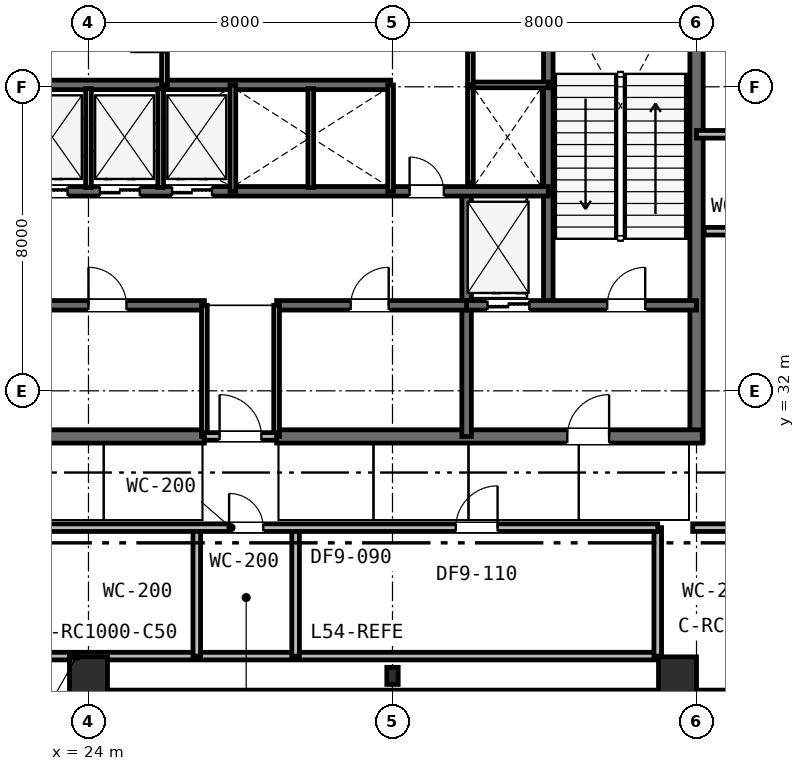
"""IFC4 building model, lengths in metres.
Left out: names, types, materials, properties, quantities, classifications, styles, units other than length and angle.
Written with IfcOpenShell. Run it as: python <this file> out.ifc"""

import sys

from ifc_helpers import new_model, si_unit, direction, frame, frame_2d, origin, origin_2d, place, context, subcontext, project, spatial, rectangle, i_section, extrude, element, fill, save


model = new_model("IFC4")
c1 = context("Model", 3, precision=1e-05, world=origin(), true_north=direction((0.0, 1.0)))
c2 = subcontext(c1, "Body", "Model", "MODEL_VIEW")
j1 = project(units=[si_unit("LENGTHUNIT", "METRE"), si_unit("PLANEANGLEUNIT", "RADIAN")], contexts=[c1])
p1 = place(None, origin())
s1 = spatial("IfcSite", under=j1, at=p1, CompositionType="ELEMENT")
p2 = place(p1, origin())
s2 = spatial("IfcBuilding", under=s1, at=p2, CompositionType="ELEMENT")
p3 = place(p2, frame((0.0, 0.0, 208.2)))
s3 = spatial("IfcBuildingStorey", under=s2, at=p3, CompositionType="ELEMENT", Elevation=208.2)
p4 = place(p3, frame((40.0, 30.65, 0.0), z_axis=(0.0, 0.0, 1.0), x_axis=(0.0, 1.0, 0.0)))
e1 = element("IfcWall", 1, at=p4, inside=s3, PredefinedType="SHEAR", context=c2, shape_type="SweptSolid", body=[
    extrude(rectangle(XDim=12.3, YDim=0.35, at=frame_2d((6.15, 0.0))), origin(), (0.0, 0.0, 1.0), 4.8),
])
p5 = place(p3, frame((15.85, 30.8, 0.0), z_axis=(0.0, 0.0, 1.0), x_axis=(1.0, 0.0, 0.0)))
e2 = element("IfcWall", 2, at=p5, inside=s3, PredefinedType="SHEAR", context=c2, shape_type="SweptSolid", body=[
    extrude(rectangle(XDim=11.2, YDim=0.35, at=frame_2d((5.6, 0.0))), origin(), (0.0, 0.0, 1.0), 4.8),
])
p6 = place(p5, frame((2.45, 0.0, 0.0)))
e3 = element("IfcOpeningElement", 3, at=p6, cuts=e2, PredefinedType="OPENING", context=c2, shape_type="SweptSolid", body=[
    extrude(rectangle(XDim=1.1, YDim=2.15, at=frame_2d((0.55, 1.075))), frame((0.0, 0.185, 0.0), z_axis=(0.0, -1.0, 0.0), x_axis=(1.0, 0.0, 0.0)), (0.0, 0.0, 1.0), 0.37),
])
p7 = place(p3, frame((28.95, 30.8, 0.0), z_axis=(0.0, 0.0, 1.0), x_axis=(1.0, 0.0, 0.0)))
e4 = element("IfcWall", 4, at=p7, inside=s3, PredefinedType="SHEAR", context=c2, shape_type="SweptSolid", body=[
    extrude(rectangle(XDim=11.2, YDim=0.35, at=frame_2d((5.6, 0.0))), origin(), (0.0, 0.0, 1.0), 4.8),
])
p8 = place(p7, frame((7.65, 0.0, 0.0)))
e5 = element("IfcOpeningElement", 5, at=p8, cuts=e4, PredefinedType="OPENING", context=c2, shape_type="SweptSolid", body=[
    extrude(rectangle(XDim=1.1, YDim=2.15, at=frame_2d((0.55, 1.075))), frame((0.0, 0.185, 0.0), z_axis=(0.0, -1.0, 0.0), x_axis=(1.0, 0.0, 0.0)), (0.0, 0.0, 1.0), 0.37),
])
p9 = place(p3, frame((36.1, 34.25, 0.0), z_axis=(0.0, 0.0, 1.0), x_axis=(0.0, 1.0, 0.0)))
e6 = element("IfcWall", 6, at=p9, inside=s3, PredefinedType="SHEAR", context=c2, shape_type="SweptSolid", body=[
    extrude(rectangle(XDim=8.65, YDim=0.25, at=frame_2d((4.325, 0.0))), origin(), (0.0, 0.0, 1.0), 4.8),
])
p10 = place(p3, frame((33.95, 30.8, 0.0), z_axis=(0.0, 0.0, 1.0), x_axis=(0.0, 1.0, 0.0)))
e7 = element("IfcWall", 7, at=p10, inside=s3, PredefinedType="SHEAR", context=c2, shape_type="SweptSolid", body=[
    extrude(rectangle(XDim=6.45, YDim=0.25, at=frame_2d((3.225, 0.0))), origin(), (0.0, 0.0, 1.0), 4.8),
])
p11 = place(p3, frame((33.95, 34.25, 0.0), z_axis=(0.0, 0.0, 1.0), x_axis=(1.0, 0.0, 0.0)))
e8 = element("IfcWall", 8, at=p11, inside=s3, PredefinedType="SHEAR", context=c2, shape_type="SweptSolid", body=[
    extrude(rectangle(XDim=6.05, YDim=0.25, at=frame_2d((3.025, 0.0))), origin(), (0.0, 0.0, 1.0), 4.8),
])
p12 = place(p11, frame((3.7, 0.0, 0.0)))
e9 = element("IfcOpeningElement", 9, at=p12, cuts=e8, PredefinedType="OPENING", context=c2, shape_type="SweptSolid", body=[
    extrude(rectangle(XDim=1.0, YDim=2.15, at=frame_2d((0.5, 1.075))), frame((0.0, 0.135, 0.0), z_axis=(0.0, -1.0, 0.0), x_axis=(1.0, 0.0, 0.0)), (0.0, 0.0, 1.0), 0.27),
])
p13 = place(p11, frame((0.55, 0.0, 0.0)))
e10 = element("IfcOpeningElement", 10, at=p13, cuts=e8, PredefinedType="OPENING", context=c2, shape_type="SweptSolid", body=[
    extrude(rectangle(XDim=1.1, YDim=2.15, at=frame_2d((0.55, 1.075))), frame((0.0, 0.135, 0.0), z_axis=(0.0, -1.0, 0.0), x_axis=(1.0, 0.0, 0.0)), (0.0, 0.0, 1.0), 0.27),
])
p14 = place(p3, frame((22.05, 34.25, 0.0), z_axis=(0.0, 0.0, 1.0), x_axis=(1.0, 0.0, 0.0)))
e11 = element("IfcWall", 11, at=p14, inside=s3, PredefinedType="SHEAR", context=c2, shape_type="SweptSolid", body=[
    extrude(rectangle(XDim=5.0, YDim=0.25, at=frame_2d((2.5, 0.0))), origin(), (0.0, 0.0, 1.0), 4.8),
])
p15 = place(p14, frame((1.95, 0.0, 0.0)))
e12 = element("IfcOpeningElement", 12, at=p15, cuts=e11, PredefinedType="OPENING", context=c2, shape_type="SweptSolid", body=[
    extrude(rectangle(XDim=1.0, YDim=2.15, at=frame_2d((0.5, 1.075))), frame((0.0, 0.135, 0.0), z_axis=(0.0, -1.0, 0.0), x_axis=(1.0, 0.0, 0.0)), (0.0, 0.0, 1.0), 0.27),
])
p16 = place(p3, frame((28.95, 34.25, 0.0), z_axis=(0.0, 0.0, 1.0), x_axis=(1.0, 0.0, 0.0)))
e13 = element("IfcWall", 13, at=p16, inside=s3, PredefinedType="SHEAR", context=c2, shape_type="SweptSolid", body=[
    extrude(rectangle(XDim=5.0, YDim=0.25, at=frame_2d((2.5, 0.0))), origin(), (0.0, 0.0, 1.0), 4.8),
])
p17 = place(p16, frame((1.95, 0.0, 0.0)))
e14 = element("IfcOpeningElement", 14, at=p17, cuts=e13, PredefinedType="OPENING", context=c2, shape_type="SweptSolid", body=[
    extrude(rectangle(XDim=1.0, YDim=2.15, at=frame_2d((0.5, 1.075))), frame((0.0, 0.135, 0.0), z_axis=(0.0, -1.0, 0.0), x_axis=(1.0, 0.0, 0.0)), (0.0, 0.0, 1.0), 0.27),
])
p18 = place(p3, frame((19.9, 37.25, 0.0), z_axis=(0.0, 0.0, 1.0), x_axis=(1.0, 0.0, 0.0)))
e15 = element("IfcWall", 15, at=p18, inside=s3, PredefinedType="SHEAR", context=c2, shape_type="SweptSolid", body=[
    extrude(rectangle(XDim=16.2, YDim=0.25, at=frame_2d((8.1, 0.0))), origin(), (0.0, 0.0, 1.0), 4.8),
])
p19 = place(p18, frame((12.55, 0.0, 0.0)))
e16 = element("IfcOpeningElement", 16, at=p19, cuts=e15, PredefinedType="OPENING", context=c2, shape_type="SweptSolid", body=[
    extrude(rectangle(XDim=0.9, YDim=2.15, at=frame_2d((0.45, 1.075))), frame((0.0, 0.135, 0.0), z_axis=(0.0, -1.0, 0.0), x_axis=(1.0, 0.0, 0.0)), (0.0, 0.0, 1.0), 0.27),
])
p20 = place(p18, frame((2.5, 0.0, 0.0)))
e17 = element("IfcOpeningElement", 17, at=p20, cuts=e15, PredefinedType="OPENING", context=c2, shape_type="SweptSolid", body=[
    extrude(rectangle(XDim=1.05, YDim=2.15, at=frame_2d((0.525, 1.075))), frame((0.0, 0.135, 0.0), z_axis=(0.0, -1.0, 0.0), x_axis=(1.0, 0.0, 0.0)), (0.0, 0.0, 1.0), 0.27),
])
p21 = place(p18, frame((4.4, 0.0, 0.0)))
e18 = element("IfcOpeningElement", 18, at=p21, cuts=e15, PredefinedType="OPENING", context=c2, shape_type="SweptSolid", body=[
    extrude(rectangle(XDim=1.05, YDim=2.15, at=frame_2d((0.525, 1.075))), frame((0.0, 0.135, 0.0), z_axis=(0.0, -1.0, 0.0), x_axis=(1.0, 0.0, 0.0)), (0.0, 0.0, 1.0), 0.27),
])
p22 = place(p18, frame((6.3, 0.0, 0.0)))
e19 = element("IfcOpeningElement", 19, at=p22, cuts=e15, PredefinedType="OPENING", context=c2, shape_type="SweptSolid", body=[
    extrude(rectangle(XDim=1.05, YDim=2.15, at=frame_2d((0.525, 1.075))), frame((0.0, 0.135, 0.0), z_axis=(0.0, -1.0, 0.0), x_axis=(1.0, 0.0, 0.0)), (0.0, 0.0, 1.0), 0.27),
])
p23 = place(p3, frame((19.9, 40.05, 0.0), z_axis=(0.0, 0.0, 1.0), x_axis=(1.0, 0.0, 0.0)))
e20 = element("IfcWall", 20, at=p23, inside=s3, PredefinedType="SHEAR", context=c2, shape_type="SweptSolid", body=[
    extrude(rectangle(XDim=12.05, YDim=0.25, at=frame_2d((6.025, 0.0))), origin(), (0.0, 0.0, 1.0), 4.8),
])
p24 = place(p3, frame((24.0, 24.5, 0.0), z_axis=(0.0, 0.0, 1.0), x_axis=(1.0, 0.0, 0.0)))
e21 = element("IfcColumn", 21, at=p24, inside=s3, PredefinedType="COLUMN", context=c2, shape_type="SweptSolid", body=[
    extrude(rectangle(XDim=1.0, YDim=1.0, at=origin_2d()), origin(), (0.0, 0.0, 1.0), 4.8),
])
p25 = place(p3, frame((32.0, 24.5, 0.0), z_axis=(0.0, 0.0, 1.0), x_axis=(1.0, 0.0, 0.0)))
e22 = element("IfcColumn", 22, at=p25, inside=s3, PredefinedType="COLUMN", context=c2, shape_type="SweptSolid", body=[
    extrude(i_section(OverallWidth=0.3, OverallDepth=0.45, WebThickness=0.014, FlangeThickness=0.026, FilletRadius=0.027, at=origin_2d()), origin(), (0.0, 0.0, 1.0), 4.8),
])
p26 = place(p3, frame((39.5, 24.5, 0.0), z_axis=(0.0, 0.0, 1.0), x_axis=(1.0, 0.0, 0.0)))
e23 = element("IfcColumn", 23, at=p26, inside=s3, PredefinedType="COLUMN", context=c2, shape_type="SweptSolid", body=[
    extrude(rectangle(XDim=1.0, YDim=1.0, at=origin_2d()), origin(), (0.0, 0.0, 1.0), 4.8),
])
p27 = place(p3, frame((24.5, 24.0, 0.0), z_axis=(0.0, 0.0, 1.0), x_axis=(1.0, 0.0, 0.0)))
e24 = element("IfcWall", 24, at=p27, inside=s3, PredefinedType="STANDARD", context=c2, shape_type="SweptSolid", body=[
    extrude(rectangle(XDim=14.5, YDim=0.25, at=frame_2d((7.25, 0.0))), origin(), (0.0, 0.0, 1.0), 1.15),
])
p28 = place(p3, frame((40.0, 24.0, 0.0), z_axis=(0.0, 0.0, 1.0), x_axis=(1.0, 0.0, 0.0)))
e25 = element("IfcWall", 25, at=p28, inside=s3, PredefinedType="STANDARD", context=c2, shape_type="SweptSolid", body=[
    extrude(rectangle(XDim=7.5, YDim=0.25, at=frame_2d((3.75, 0.0))), origin(), (0.0, 0.0, 1.0), 1.15),
])
for number, where, z_axis, x_axis in (
    (26, (27.05, 30.8, 0.0), (0.0, 0.0, 1.0), (0.0, 1.0, 0.0)),
    (27, (28.95, 30.8, 0.0), (0.0, 0.0, 1.0), (0.0, 1.0, 0.0)),
):
    element("IfcWall", number, at=place(p3, frame(where, z_axis=z_axis, x_axis=x_axis)), inside=s3, PredefinedType="PLUMBINGWALL", context=c2, shape_type="SweptSolid", body=[
        extrude(rectangle(XDim=3.45, YDim=0.15, at=frame_2d((1.725, 0.0))), origin(), (0.0, 0.0, 1.0), 4.02),
    ])
p29 = place(p3, frame((27.05, 30.8, 0.0), z_axis=(0.0, 0.0, 1.0), x_axis=(1.0, 0.0, 0.0)))
e28 = element("IfcWall", 28, at=p29, inside=s3, PredefinedType="PARTITIONING", context=c2, shape_type="SweptSolid", body=[
    extrude(rectangle(XDim=1.9, YDim=0.2, at=frame_2d((0.95, 0.0))), origin(), (0.0, 0.0, 1.0), 4.02),
])
p30 = place(p29, frame((0.4, 0.0, 0.0)))
e29 = element("IfcOpeningElement", 29, at=p30, cuts=e28, PredefinedType="OPENING", context=c2, shape_type="SweptSolid", body=[
    extrude(rectangle(XDim=1.1, YDim=2.15, at=frame_2d((0.55, 1.075))), frame((0.0, 0.11, 0.0), z_axis=(0.0, -1.0, 0.0), x_axis=(1.0, 0.0, 0.0)), (0.0, 0.0, 1.0), 0.22),
])
p31 = place(p3, frame((27.8, 37.25, 0.0), z_axis=(0.0, 0.0, 1.0), x_axis=(0.0, 1.0, 0.0)))
e30 = element("IfcWall", 30, at=p31, inside=s3, PredefinedType="PLUMBINGWALL", context=c2, shape_type="SweptSolid", body=[
    extrude(rectangle(XDim=2.8, YDim=0.15, at=frame_2d((1.4, 0.0))), origin(), (0.0, 0.0, 1.0), 4.02),
])
for number, where, z_axis, x_axis in (
    (31, (24.0, 37.35, 0.0), (0.0, 0.0, 1.0), (0.0, 1.0, 0.0)),
    (32, (25.9, 37.35, 0.0), (0.0, 0.0, 1.0), (0.0, 1.0, 0.0)),
):
    element("IfcWall", number, at=place(p3, frame(where, z_axis=z_axis, x_axis=x_axis)), inside=s3, PredefinedType="PLUMBINGWALL", context=c2, shape_type="SweptSolid", body=[
        extrude(rectangle(XDim=2.6, YDim=0.15, at=frame_2d((1.3, 0.0))), origin(), (0.0, 0.0, 1.0), 4.02),
    ])
p32 = place(p3, frame((31.95, 37.25, 0.0), z_axis=(0.0, 0.0, 1.0), x_axis=(0.0, 1.0, 0.0)))
e33 = element("IfcWall", 33, at=p32, inside=s3, PredefinedType="PLUMBINGWALL", context=c2, shape_type="SweptSolid", body=[
    extrude(rectangle(XDim=2.8, YDim=0.15, at=frame_2d((1.4, 0.0))), origin(), (0.0, 0.0, 1.0), 4.02),
])
p33 = place(p3, frame((29.85, 37.35, 0.0), z_axis=(0.0, 0.0, 1.0), x_axis=(0.0, 1.0, 0.0)))
e34 = element("IfcWall", 34, at=p33, inside=s3, PredefinedType="PLUMBINGWALL", context=c2, shape_type="SweptSolid", body=[
    extrude(rectangle(XDim=2.6, YDim=0.15, at=frame_2d((1.3, 0.0))), origin(), (0.0, 0.0, 1.0), 4.02),
])
p34 = place(p3, frame((34.05, 37.473, 0.0), z_axis=(0.0, 0.0, 1.0), x_axis=(0.0, 1.0, 0.0)))
e35 = element("IfcWall", 35, at=p34, inside=s3, PredefinedType="PLUMBINGWALL", context=c2, shape_type="SweptSolid", body=[
    extrude(rectangle(XDim=2.577, YDim=0.15, at=frame_2d((1.288, 0.0))), origin(), (0.0, 0.0, 1.0), 4.02),
])
p35 = place(p3, frame((34.05, 40.05, 0.0), z_axis=(0.0, 0.0, 1.0), x_axis=(1.0, 0.0, 0.0)))
e36 = element("IfcWall", 36, at=p35, inside=s3, PredefinedType="PARTITIONING", context=c2, shape_type="SweptSolid", body=[
    extrude(rectangle(XDim=2.05, YDim=0.15, at=frame_2d((1.025, 0.0))), origin(), (0.0, 0.0, 1.0), 4.02),
])
p36 = place(p3, frame((34.05, 40.05, 0.0), z_axis=(0.0, 0.0, 1.0), x_axis=(0.0, 1.0, 0.0)))
e37 = element("IfcWall", 37, at=p36, inside=s3, PredefinedType="PARTITIONING", context=c2, shape_type="SweptSolid", body=[
    extrude(rectangle(XDim=2.85, YDim=0.15, at=frame_2d((1.425, 0.0))), origin(), (0.0, 0.0, 1.0), 4.02),
])
p37 = place(p36, frame((0.865, 0.0, 0.0)))
e38 = element("IfcOpeningElement", 38, at=p37, cuts=e37, PredefinedType="OPENING", context=c2, shape_type="SweptSolid", body=[
    extrude(rectangle(XDim=0.9, YDim=2.15, at=frame_2d((0.45, 1.075))), frame((0.0, 0.085, 0.0), z_axis=(0.0, -1.0, 0.0), x_axis=(1.0, 0.0, 0.0)), (0.0, 0.0, 1.0), 0.17),
])
p38 = place(p3, frame((26.0, 40.05, 0.0), z_axis=(0.0, 0.0, 1.0), x_axis=(0.0, 1.0, 0.0)))
e39 = element("IfcWall", 39, at=p38, inside=s3, PredefinedType="PARTITIONING", context=c2, shape_type="SweptSolid", body=[
    extrude(rectangle(XDim=2.85, YDim=0.15, at=frame_2d((1.425, 0.0))), origin(), (0.0, 0.0, 1.0), 4.02),
])
p39 = place(p38, frame((0.865, 0.0, 0.0)))
e40 = element("IfcOpeningElement", 40, at=p39, cuts=e39, PredefinedType="OPENING", context=c2, shape_type="SweptSolid", body=[
    extrude(rectangle(XDim=0.9, YDim=2.15, at=frame_2d((0.45, 1.075))), frame((0.0, 0.085, 0.0), z_axis=(0.0, -1.0, 0.0), x_axis=(1.0, 0.0, 0.0)), (0.0, 0.0, 1.0), 0.17),
])
p40 = place(p3, frame((8.4, 25.02, 0.0), z_axis=(0.0, 0.0, 1.0), x_axis=(1.0, 0.0, 0.0)))
e41 = element("IfcWall", 41, at=p40, inside=s3, PredefinedType="PARTITIONING", context=c2, shape_type="SweptSolid", body=[
    extrude(rectangle(XDim=30.6, YDim=0.2, at=frame_2d((15.3, 0.0))), origin(), (0.0, 0.0, 1.0), 3.83),
])
p41 = place(p3, frame((38.98, 25.02, 0.0), z_axis=(0.0, 0.0, 1.0), x_axis=(0.0, 1.0, 0.0)))
e42 = element("IfcWall", 42, at=p41, inside=s3, PredefinedType="PARTITIONING", context=c2, shape_type="SweptSolid", body=[
    extrude(rectangle(XDim=3.38, YDim=0.2, at=frame_2d((1.69, 0.0))), origin(), (0.0, 0.0, 1.0), 3.83),
])
p42 = place(p3, frame((40.0, 38.75, 0.0), z_axis=(0.0, 0.0, 1.0), x_axis=(1.0, 0.0, 0.0)))
e43 = element("IfcWall", 43, at=p42, inside=s3, PredefinedType="PARTITIONING", context=c2, shape_type="SweptSolid", body=[
    extrude(rectangle(XDim=10.9, YDim=0.2, at=frame_2d((5.45, 0.0))), origin(), (0.0, 0.0, 1.0), 3.83),
])
for number, where, z_axis, x_axis in (
    (44, (26.85, 25.02, 0.0), (0.0, 0.0, 1.0), (0.0, 1.0, 0.0)),
    (45, (29.45, 25.02, 0.0), (0.0, 0.0, 1.0), (0.0, 1.0, 0.0)),
):
    element("IfcWall", number, at=place(p3, frame(where, z_axis=z_axis, x_axis=x_axis)), inside=s3, PredefinedType="PARTITIONING", context=c2, shape_type="SweptSolid", body=[
        extrude(rectangle(XDim=3.38, YDim=0.2, at=frame_2d((1.69, 0.0))), origin(), (0.0, 0.0, 1.0), 4.02),
    ])
p43 = place(p3, frame((16.52, 28.4, 0.0), z_axis=(0.0, 0.0, 1.0), x_axis=(1.0, 0.0, 0.0)))
e46 = element("IfcWall", 46, at=p43, inside=s3, PredefinedType="PARTITIONING", context=c2, shape_type="SweptSolid", body=[
    extrude(rectangle(XDim=22.46, YDim=0.2, at=frame_2d((11.23, 0.0))), origin(), (0.0, 0.0, 1.0), 3.83),
])
p44 = place(p43, frame((4.615, 0.0, 0.0)))
e47 = element("IfcOpeningElement", 47, at=p44, cuts=e46, PredefinedType="OPENING", context=c2, shape_type="SweptSolid", body=[
    extrude(rectangle(XDim=1.1, YDim=2.15, at=frame_2d((0.55, 1.075))), frame((0.0, 0.11, 0.0), z_axis=(0.0, -1.0, 0.0), x_axis=(1.0, 0.0, 0.0)), (0.0, 0.0, 1.0), 0.22),
])
p45 = place(p43, frame((11.18, 0.0, 0.0)))
e48 = element("IfcOpeningElement", 48, at=p45, cuts=e46, PredefinedType="OPENING", context=c2, shape_type="SweptSolid", body=[
    extrude(rectangle(XDim=0.9, YDim=2.15, at=frame_2d((0.45, 1.075))), frame((0.0, 0.11, 0.0), z_axis=(0.0, -1.0, 0.0), x_axis=(1.0, 0.0, 0.0)), (0.0, 0.0, 1.0), 0.22),
])
p46 = place(p43, frame((17.145, 0.0, 0.0)))
e49 = element("IfcOpeningElement", 49, at=p46, cuts=e46, PredefinedType="OPENING", context=c2, shape_type="SweptSolid", body=[
    extrude(rectangle(XDim=1.1, YDim=2.15, at=frame_2d((0.55, 1.075))), frame((0.0, 0.11, 0.0), z_axis=(0.0, -1.0, 0.0), x_axis=(1.0, 0.0, 0.0)), (0.0, 0.0, 1.0), 0.22),
])
p47 = place(p3, frame((39.9, 28.4, 0.0), z_axis=(0.0, 0.0, 1.0), x_axis=(1.0, 0.0, 0.0)))
e50 = element("IfcWall", 50, at=p47, inside=s3, PredefinedType="PARTITIONING", context=c2, shape_type="SweptSolid", body=[
    extrude(rectangle(XDim=2.5, YDim=0.2, at=frame_2d((1.25, 0.0))), origin(), (0.0, 0.0, 1.0), 3.83),
])
p48 = place(p3, frame((40.2, 36.2, 0.0), z_axis=(0.0, 0.0, 1.0), x_axis=(1.0, 0.0, 0.0)))
e51 = element("IfcWall", 51, at=p48, inside=s3, PredefinedType="PARTITIONING", context=c2, shape_type="SweptSolid", body=[
    extrude(rectangle(XDim=2.2, YDim=0.2, at=frame_2d((1.1, 0.0))), origin(), (0.0, 0.0, 1.0), 4.02),
])
p49 = place(p30, origin())
e52 = element("IfcDoor", 52, at=p49, inside=s3, OperationType="SINGLE_SWING_LEFT", PredefinedType="DOOR", context=c2, shape_type="SweptSolid", body=[
    extrude(rectangle(XDim=1.1, YDim=2.15, at=frame_2d((0.55, 1.075))), frame((0.0, 0.025, 0.0), z_axis=(0.0, -1.0, 0.0), x_axis=(1.0, 0.0, 0.0)), (0.0, 0.0, 1.0), 0.05),
])
fill(e29, e52)
p50 = place(p12, origin())
e53 = element("IfcDoor", 53, at=p50, inside=s3, OperationType="SINGLE_SWING_RIGHT", PredefinedType="DOOR", context=c2, shape_type="SweptSolid", body=[
    extrude(rectangle(XDim=1.0, YDim=2.15, at=frame_2d((0.5, 1.075))), frame((0.0, 0.025, 0.0), z_axis=(0.0, -1.0, 0.0), x_axis=(1.0, 0.0, 0.0)), (0.0, 0.0, 1.0), 0.05),
])
fill(e9, e53)
p51 = place(p8, origin())
e54 = element("IfcDoor", 54, at=p51, inside=s3, OperationType="SINGLE_SWING_RIGHT", PredefinedType="DOOR", context=c2, shape_type="SweptSolid", body=[
    extrude(rectangle(XDim=1.1, YDim=2.15, at=frame_2d((0.55, 1.075))), frame((0.0, 0.025, 0.0), z_axis=(0.0, -1.0, 0.0), x_axis=(1.0, 0.0, 0.0)), (0.0, 0.0, 1.0), 0.05),
])
fill(e5, e54)
p52 = place(p15, origin())
e55 = element("IfcDoor", 55, at=p52, inside=s3, OperationType="SINGLE_SWING_LEFT", PredefinedType="DOOR", context=c2, shape_type="SweptSolid", body=[
    extrude(rectangle(XDim=1.0, YDim=2.15, at=frame_2d((0.5, 1.075))), frame((0.0, 0.025, 0.0), z_axis=(0.0, -1.0, 0.0), x_axis=(1.0, 0.0, 0.0)), (0.0, 0.0, 1.0), 0.05),
])
fill(e12, e55)
p53 = place(p17, origin())
e56 = element("IfcDoor", 56, at=p53, inside=s3, OperationType="SINGLE_SWING_RIGHT", PredefinedType="DOOR", context=c2, shape_type="SweptSolid", body=[
    extrude(rectangle(XDim=1.0, YDim=2.15, at=frame_2d((0.5, 1.075))), frame((0.0, 0.025, 0.0), z_axis=(0.0, -1.0, 0.0), x_axis=(1.0, 0.0, 0.0)), (0.0, 0.0, 1.0), 0.05),
])
fill(e14, e56)
p54 = place(p19, origin())
e57 = element("IfcDoor", 57, at=p54, inside=s3, OperationType="SINGLE_SWING_LEFT", PredefinedType="DOOR", context=c2, shape_type="SweptSolid", body=[
    extrude(rectangle(XDim=0.9, YDim=2.15, at=frame_2d((0.45, 1.075))), frame((0.0, 0.025, 0.0), z_axis=(0.0, -1.0, 0.0), x_axis=(1.0, 0.0, 0.0)), (0.0, 0.0, 1.0), 0.05),
])
fill(e16, e57)
p55 = place(p45, origin())
e58 = element("IfcDoor", 58, at=p55, inside=s3, OperationType="SINGLE_SWING_LEFT", PredefinedType="DOOR", context=c2, shape_type="SweptSolid", body=[
    extrude(rectangle(XDim=0.9, YDim=2.15, at=frame_2d((0.45, 1.075))), frame((0.0, 0.025, 0.0), z_axis=(0.0, -1.0, 0.0), x_axis=(1.0, 0.0, 0.0)), (0.0, 0.0, 1.0), 0.05),
])
fill(e48, e58)
p56 = place(p46, origin())
e59 = element("IfcDoor", 59, at=p56, inside=s3, OperationType="SINGLE_SWING_RIGHT", PredefinedType="DOOR", context=c2, shape_type="SweptSolid", body=[
    extrude(rectangle(XDim=1.1, YDim=2.15, at=frame_2d((0.55, 1.075))), frame((0.0, 0.025, 0.0), z_axis=(0.0, -1.0, 0.0), x_axis=(1.0, 0.0, 0.0)), (0.0, 0.0, 1.0), 0.05),
])
fill(e49, e59)
p57 = place(p13, origin())
e60 = element("IfcDoor", 60, at=p57, inside=s3, OperationType="DOUBLE_DOOR_SLIDING", PredefinedType="DOOR", context=c2, shape_type="SweptSolid", body=[
    extrude(rectangle(XDim=1.1, YDim=2.15, at=frame_2d((0.55, 1.075))), frame((0.0, 0.025, 0.0), z_axis=(0.0, -1.0, 0.0), x_axis=(1.0, 0.0, 0.0)), (0.0, 0.0, 1.0), 0.05),
])
fill(e10, e60)
p58 = place(p20, origin())
e61 = element("IfcDoor", 61, at=p58, inside=s3, OperationType="DOUBLE_DOOR_SLIDING", PredefinedType="DOOR", context=c2, shape_type="SweptSolid", body=[
    extrude(rectangle(XDim=1.05, YDim=2.15, at=frame_2d((0.525, 1.075))), frame((0.0, 0.025, 0.0), z_axis=(0.0, -1.0, 0.0), x_axis=(1.0, 0.0, 0.0)), (0.0, 0.0, 1.0), 0.05),
])
fill(e17, e61)
p59 = place(p21, origin())
e62 = element("IfcDoor", 62, at=p59, inside=s3, OperationType="DOUBLE_DOOR_SLIDING", PredefinedType="DOOR", context=c2, shape_type="SweptSolid", body=[
    extrude(rectangle(XDim=1.05, YDim=2.15, at=frame_2d((0.525, 1.075))), frame((0.0, 0.025, 0.0), z_axis=(0.0, -1.0, 0.0), x_axis=(1.0, 0.0, 0.0)), (0.0, 0.0, 1.0), 0.05),
])
fill(e18, e62)
p60 = place(p22, origin())
e63 = element("IfcDoor", 63, at=p60, inside=s3, OperationType="DOUBLE_DOOR_SLIDING", PredefinedType="DOOR", context=c2, shape_type="SweptSolid", body=[
    extrude(rectangle(XDim=1.05, YDim=2.15, at=frame_2d((0.525, 1.075))), frame((0.0, 0.025, 0.0), z_axis=(0.0, -1.0, 0.0), x_axis=(1.0, 0.0, 0.0)), (0.0, 0.0, 1.0), 0.05),
])
fill(e19, e63)
save(model, sys.argv[1])
